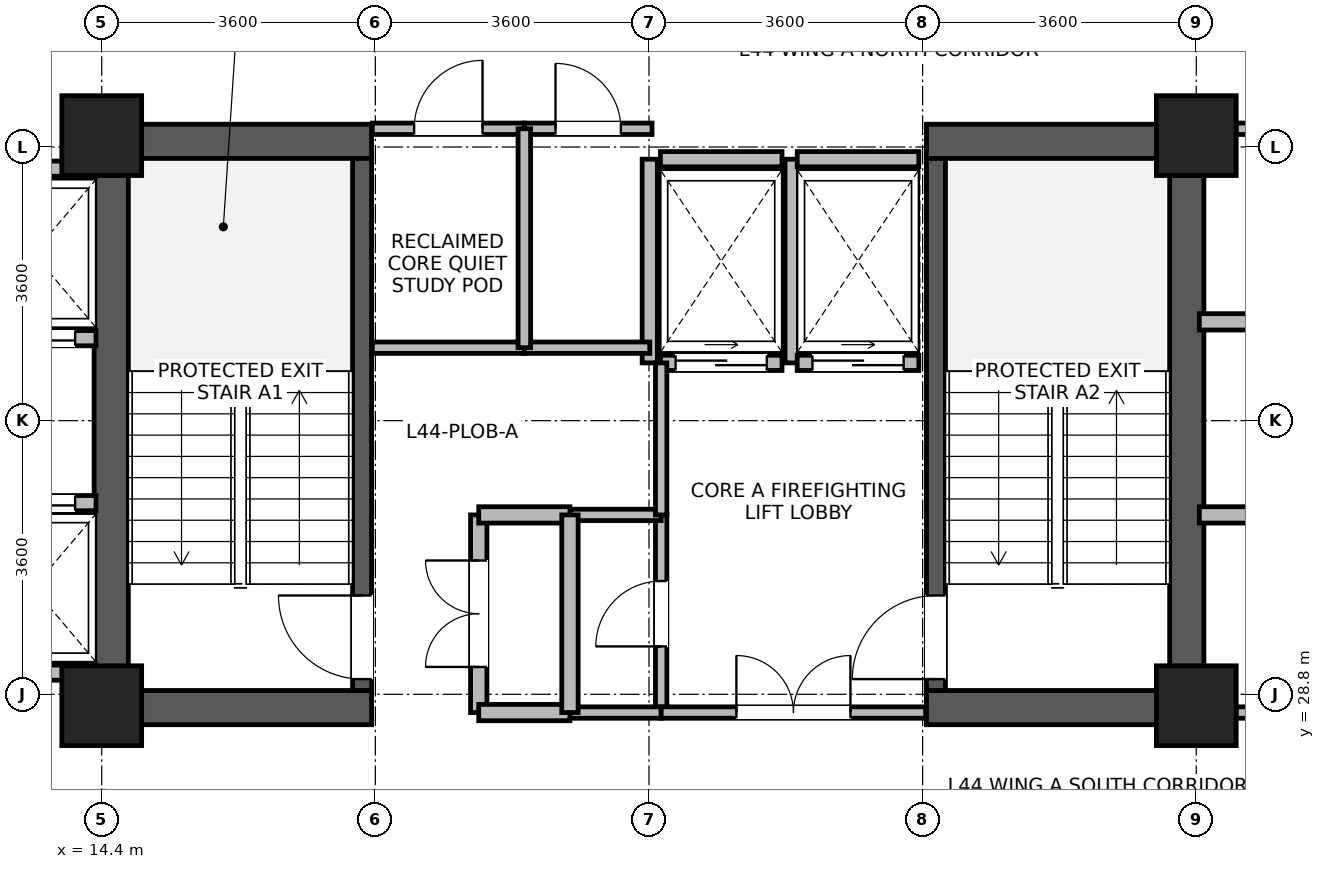
"""IFC4 building model, lengths in metres.
Left out: names, types, materials, properties, quantities, classifications, styles, units other than length and angle.
Written with IfcOpenShell. Run it as: python <this file> out.ifc"""

import sys

from ifc_helpers import new_model, si_unit, direction, frame, frame_2d, origin, origin_2d, place, context, subcontext, project, spatial, rectangle, extrude, source, transform, mapped, element, fill, save


model = new_model("IFC4")
c1 = context("Model", 3, precision=1e-05, world=origin(), true_north=direction((0.0, 1.0)))
c2 = subcontext(c1, "Body", "Model", "MODEL_VIEW")
j1 = project(units=[si_unit("LENGTHUNIT", "METRE"), si_unit("PLANEANGLEUNIT", "RADIAN")], contexts=[c1])
p1 = place(None, origin())
s1 = spatial("IfcSite", under=j1, at=p1, CompositionType="ELEMENT")
p2 = place(p1, origin())
s2 = spatial("IfcBuilding", under=s1, at=p2, CompositionType="ELEMENT")
p3 = place(p2, frame((0.0, 0.0, 173.5)))
s3 = spatial("IfcBuildingStorey", under=s2, at=p3, CompositionType="ELEMENT", Elevation=173.5)
for number, where, z_axis, x_axis in (
    (1, (14.525, 28.4, 0.0), (0.0, 0.0, 1.0), (0.0, 1.0, 0.0)),
    (2, (28.675, 28.4, 0.0), (0.0, 0.0, 1.0), (0.0, 1.0, 0.0)),
):
    element("IfcWall", number, at=place(p3, frame(where, z_axis=z_axis, x_axis=x_axis)), inside=s3, PredefinedType="SHEAR", context=c2, shape_type="SweptSolid", body=[
        extrude(rectangle(XDim=7.9, YDim=0.45, at=frame_2d((3.95, 0.0))), origin(), (0.0, 0.0, 1.0), 3.46),
    ])
for number, where, z_axis, x_axis in (
    (3, (14.75, 28.625, 0.0), (0.0, 0.0, 1.0), (1.0, 0.0, 0.0)),
    (4, (25.25, 28.625, 0.0), (0.0, 0.0, 1.0), (1.0, 0.0, 0.0)),
    (5, (14.75, 36.075, 0.0), (0.0, 0.0, 1.0), (1.0, 0.0, 0.0)),
    (6, (25.25, 36.075, 0.0), (0.0, 0.0, 1.0), (1.0, 0.0, 0.0)),
):
    element("IfcWall", number, at=place(p3, frame(where, z_axis=z_axis, x_axis=x_axis)), inside=s3, PredefinedType="SHEAR", context=c2, shape_type="SweptSolid", body=[
        extrude(rectangle(XDim=3.2, YDim=0.45, at=frame_2d((1.6, 0.0))), origin(), (0.0, 0.0, 1.0), 3.46),
    ])
p4 = place(p3, frame((17.825, 28.85, 0.0), z_axis=(0.0, 0.0, 1.0), x_axis=(0.0, 1.0, 0.0)))
e7 = element("IfcWall", 7, at=p4, inside=s3, PredefinedType="SHEAR", context=c2, shape_type="SweptSolid", body=[
    extrude(rectangle(XDim=7.0, YDim=0.25, at=frame_2d((3.5, 0.0))), origin(), (0.0, 0.0, 1.0), 3.46),
])
p5 = place(p4, frame((0.15, 0.0, 0.0)))
e8 = element("IfcOpeningElement", 8, at=p5, cuts=e7, PredefinedType="OPENING", context=c2, shape_type="SweptSolid", body=[
    extrude(rectangle(XDim=1.1, YDim=2.08, at=frame_2d((0.55, 1.04))), frame((0.0, 0.135, 0.0), z_axis=(0.0, -1.0, 0.0), x_axis=(1.0, 0.0, 0.0)), (0.0, 0.0, 1.0), 0.27),
])
p6 = place(p3, frame((25.375, 28.85, 0.0), z_axis=(0.0, 0.0, 1.0), x_axis=(0.0, 1.0, 0.0)))
e9 = element("IfcWall", 9, at=p6, inside=s3, PredefinedType="SHEAR", context=c2, shape_type="SweptSolid", body=[
    extrude(rectangle(XDim=7.0, YDim=0.25, at=frame_2d((3.5, 0.0))), origin(), (0.0, 0.0, 1.0), 3.46),
])
p7 = place(p6, frame((0.15, 0.0, 0.0)))
e10 = element("IfcOpeningElement", 10, at=p7, cuts=e9, PredefinedType="OPENING", context=c2, shape_type="SweptSolid", body=[
    extrude(rectangle(XDim=1.1, YDim=2.08, at=frame_2d((0.55, 1.04))), frame((0.0, 0.135, 0.0), z_axis=(0.0, -1.0, 0.0), x_axis=(1.0, 0.0, 0.0)), (0.0, 0.0, 1.0), 0.27),
])
m1 = source(origin(), c2, "Body", "SweptSolid", [
    extrude(rectangle(XDim=1.05, YDim=1.05, at=origin_2d()), origin(), (0.0, 0.0, 1.0), 3.7),
])
for number, where, z_axis, x_axis in (
    (11, (14.4, 28.65, 0.0), (0.0, 0.0, 1.0), (1.0, 0.0, 0.0)),
    (12, (14.4, 36.15, 0.0), (0.0, 0.0, 1.0), (1.0, 0.0, 0.0)),
    (13, (28.8, 28.65, 0.0), (0.0, 0.0, 1.0), (1.0, 0.0, 0.0)),
    (14, (28.8, 36.15, 0.0), (0.0, 0.0, 1.0), (1.0, 0.0, 0.0)),
):
    element("IfcColumn", number, at=place(p3, frame(where, z_axis=z_axis, x_axis=x_axis)), inside=s3, PredefinedType="COLUMN", context=c2, shape_type="MappedRepresentation", body=[
        mapped(m1, transform((0.0, 0.0, 0.0), x_axis=(1.0, 0.0, 0.0), y_axis=(0.0, 1.0, 0.0), z_axis=(0.0, 0.0, 1.0), scale=1.0)),
    ])
p8 = place(p3, frame((12.675, 33.485, 0.0), z_axis=(0.0, 0.0, 1.0), x_axis=(1.0, 0.0, 0.0)))
e15 = element("IfcWall", 15, at=p8, inside=s3, PredefinedType="PARTITIONING", context=c2, shape_type="SweptSolid", body=[
    extrude(rectangle(XDim=1.65, YDim=0.2, at=frame_2d((0.825, 0.0))), origin(), (0.0, 0.0, 1.0), 3.44),
])
p9 = place(p8, frame((0.275, 0.0, 0.0)))
e16 = element("IfcOpeningElement", 16, at=p9, cuts=e15, PredefinedType="OPENING", context=c2, shape_type="SweptSolid", body=[
    extrude(rectangle(XDim=1.1, YDim=2.12, at=frame_2d((0.55, 1.06))), frame((0.0, 0.11, 0.0), z_axis=(0.0, -1.0, 0.0), x_axis=(1.0, 0.0, 0.0)), (0.0, 0.0, 1.0), 0.22),
])
for number, where, z_axis, x_axis in (
    (17, (12.675, 35.715, 0.0), (0.0, 0.0, 1.0), (1.0, 0.0, 0.0)),
    (18, (12.675, 29.085, 0.0), (0.0, 0.0, 1.0), (1.0, 0.0, 0.0)),
):
    element("IfcWall", number, at=place(p3, frame(where, z_axis=z_axis, x_axis=x_axis)), inside=s3, PredefinedType="PARTITIONING", context=c2, shape_type="SweptSolid", body=[
        extrude(rectangle(XDim=1.65, YDim=0.2, at=frame_2d((0.825, 0.0))), origin(), (0.0, 0.0, 1.0), 3.44),
    ])
p10 = place(p3, frame((12.675, 31.315, 0.0), z_axis=(0.0, 0.0, 1.0), x_axis=(1.0, 0.0, 0.0)))
e19 = element("IfcWall", 19, at=p10, inside=s3, PredefinedType="PARTITIONING", context=c2, shape_type="SweptSolid", body=[
    extrude(rectangle(XDim=1.65, YDim=0.2, at=frame_2d((0.825, 0.0))), origin(), (0.0, 0.0, 1.0), 3.44),
])
p11 = place(p10, frame((0.275, 0.0, 0.0)))
e20 = element("IfcOpeningElement", 20, at=p11, cuts=e19, PredefinedType="OPENING", context=c2, shape_type="SweptSolid", body=[
    extrude(rectangle(XDim=1.1, YDim=2.12, at=frame_2d((0.55, 1.06))), frame((0.0, 0.11, 0.0), z_axis=(0.0, -1.0, 0.0), x_axis=(1.0, 0.0, 0.0)), (0.0, 0.0, 1.0), 0.22),
])
p12 = place(p3, frame((21.75, 33.16, 0.0), z_axis=(0.0, 0.0, 1.0), x_axis=(1.0, 0.0, 0.0)))
e21 = element("IfcWall", 21, at=p12, inside=s3, PredefinedType="PARTITIONING", context=c2, shape_type="SweptSolid", body=[
    extrude(rectangle(XDim=1.6, YDim=0.2, at=frame_2d((0.8, 0.0))), origin(), (0.0, 0.0, 1.0), 3.44),
])
p13 = place(p12, frame((0.2, 0.0, 0.0)))
e22 = element("IfcOpeningElement", 22, at=p13, cuts=e21, PredefinedType="OPENING", context=c2, shape_type="SweptSolid", body=[
    extrude(rectangle(XDim=1.2, YDim=2.12, at=frame_2d((0.6, 1.06))), frame((0.0, 0.11, 0.0), z_axis=(0.0, -1.0, 0.0), x_axis=(1.0, 0.0, 0.0)), (0.0, 0.0, 1.0), 0.22),
])
p14 = place(p3, frame((21.75, 35.84, 0.0), z_axis=(0.0, 0.0, 1.0), x_axis=(1.0, 0.0, 0.0)))
e23 = element("IfcWall", 23, at=p14, inside=s3, PredefinedType="PARTITIONING", context=c2, shape_type="SweptSolid", body=[
    extrude(rectangle(XDim=1.6, YDim=0.2, at=frame_2d((0.8, 0.0))), origin(), (0.0, 0.0, 1.0), 2.44),
])
for number, where, z_axis, x_axis in (
    (24, (21.61, 33.16, 0.0), (0.0, 0.0, 1.0), (0.0, 1.0, 0.0)),
    (25, (23.49, 33.16, 0.0), (0.0, 0.0, 1.0), (0.0, 1.0, 0.0)),
):
    element("IfcWall", number, at=place(p3, frame(where, z_axis=z_axis, x_axis=x_axis)), inside=s3, PredefinedType="PARTITIONING", context=c2, shape_type="SweptSolid", body=[
        extrude(rectangle(XDim=2.68, YDim=0.2, at=frame_2d((1.34, 0.0))), origin(), (0.0, 0.0, 1.0), 3.44),
    ])
p15 = place(p3, frame((23.55, 33.16, 0.0), z_axis=(0.0, 0.0, 1.0), x_axis=(1.0, 0.0, 0.0)))
e26 = element("IfcWall", 26, at=p15, inside=s3, PredefinedType="PARTITIONING", context=c2, shape_type="SweptSolid", body=[
    extrude(rectangle(XDim=1.6, YDim=0.2, at=frame_2d((0.8, 0.0))), origin(), (0.0, 0.0, 1.0), 3.44),
])
p16 = place(p15, frame((0.2, 0.0, 0.0)))
e27 = element("IfcOpeningElement", 27, at=p16, cuts=e26, PredefinedType="OPENING", context=c2, shape_type="SweptSolid", body=[
    extrude(rectangle(XDim=1.2, YDim=2.12, at=frame_2d((0.6, 1.06))), frame((0.0, 0.11, 0.0), z_axis=(0.0, -1.0, 0.0), x_axis=(1.0, 0.0, 0.0)), (0.0, 0.0, 1.0), 0.22),
])
p17 = place(p3, frame((23.55, 35.84, 0.0), z_axis=(0.0, 0.0, 1.0), x_axis=(1.0, 0.0, 0.0)))
e28 = element("IfcWall", 28, at=p17, inside=s3, PredefinedType="PARTITIONING", context=c2, shape_type="SweptSolid", body=[
    extrude(rectangle(XDim=1.6, YDim=0.2, at=frame_2d((0.8, 0.0))), origin(), (0.0, 0.0, 1.0), 2.44),
])
p18 = place(p3, frame((19.36, 28.56, 0.0), z_axis=(0.0, 0.0, 1.0), x_axis=(0.0, 1.0, 0.0)))
e29 = element("IfcWall", 29, at=p18, inside=s3, PredefinedType="PARTITIONING", context=c2, shape_type="SweptSolid", body=[
    extrude(rectangle(XDim=2.6, YDim=0.215, at=frame_2d((1.3, 0.0))), origin(), (0.0, 0.0, 1.0), 3.44),
])
p19 = place(p18, frame((0.6, 0.0, 0.0)))
e30 = element("IfcOpeningElement", 30, at=p19, cuts=e29, PredefinedType="OPENING", context=c2, shape_type="SweptSolid", body=[
    extrude(rectangle(XDim=1.4, YDim=2.15, at=frame_2d((0.7, 1.075))), frame((0.0, 0.118, 0.0), z_axis=(0.0, -1.0, 0.0), x_axis=(1.0, 0.0, 0.0)), (0.0, 0.0, 1.0), 0.235),
])
p20 = place(p3, frame((21.76, 28.56, 0.0), z_axis=(0.0, 0.0, 1.0), x_axis=(0.0, 1.0, 0.0)))
e31 = element("IfcWall", 31, at=p20, inside=s3, PredefinedType="PARTITIONING", context=c2, shape_type="SweptSolid", body=[
    extrude(rectangle(XDim=2.6, YDim=0.15, at=frame_2d((1.3, 0.0))), origin(), (0.0, 0.0, 1.0), 3.44),
])
p21 = place(p20, frame((0.87, 0.0, 0.0)))
e32 = element("IfcOpeningElement", 32, at=p21, cuts=e31, PredefinedType="OPENING", context=c2, shape_type="SweptSolid", body=[
    extrude(rectangle(XDim=0.86, YDim=2.02, at=frame_2d((0.43, 1.01))), frame((0.0, 0.085, 0.0), z_axis=(0.0, -1.0, 0.0), x_axis=(1.0, 0.0, 0.0)), (0.0, 0.0, 1.0), 0.17),
])
p22 = place(p3, frame((17.96, 33.36, 0.0), z_axis=(0.0, 0.0, 1.0), x_axis=(1.0, 0.0, 0.0)))
e33 = element("IfcWall", 33, at=p22, inside=s3, PredefinedType="PARTITIONING", context=c2, shape_type="SweptSolid", body=[
    extrude(rectangle(XDim=2.0, YDim=0.15, at=frame_2d((1.0, 0.0))), origin(), (0.0, 0.0, 1.0), 3.44),
])
p23 = place(p3, frame((17.96, 36.24, 0.0), z_axis=(0.0, 0.0, 1.0), x_axis=(1.0, 0.0, 0.0)))
e34 = element("IfcWall", 34, at=p23, inside=s3, PredefinedType="PARTITIONING", context=c2, shape_type="SweptSolid", body=[
    extrude(rectangle(XDim=2.0, YDim=0.15, at=frame_2d((1.0, 0.0))), origin(), (0.0, 0.0, 1.0), 2.44),
])
p24 = place(p23, frame((0.55, 0.0, 0.0)))
e35 = element("IfcOpeningElement", 35, at=p24, cuts=e34, PredefinedType="OPENING", context=c2, shape_type="SweptSolid", body=[
    extrude(rectangle(XDim=0.9, YDim=2.08, at=frame_2d((0.45, 1.04))), frame((0.0, 0.085, 0.0), z_axis=(0.0, -1.0, 0.0), x_axis=(1.0, 0.0, 0.0)), (0.0, 0.0, 1.0), 0.17),
])
for number, where, z_axis, x_axis in (
    (36, (29.325, 28.56, 0.0), (0.0, 0.0, 1.0), (1.0, 0.0, 0.0)),
    (37, (29.325, 36.24, 0.0), (0.0, 0.0, 1.0), (1.0, 0.0, 0.0)),
):
    element("IfcWall", number, at=place(p3, frame(where, z_axis=z_axis, x_axis=x_axis)), inside=s3, PredefinedType="PARTITIONING", context=c2, shape_type="SweptSolid", body=[
        extrude(rectangle(XDim=1.235, YDim=0.15, at=frame_2d((0.618, 0.0))), origin(), (0.0, 0.0, 1.0), 2.84),
    ])
p25 = place(p3, frame((19.96, 33.36, 0.0), z_axis=(0.0, 0.0, 1.0), x_axis=(1.0, 0.0, 0.0)))
e38 = element("IfcWall", 38, at=p25, inside=s3, PredefinedType="PARTITIONING", context=c2, shape_type="SweptSolid", body=[
    extrude(rectangle(XDim=1.65, YDim=0.15, at=frame_2d((0.825, 0.0))), origin(), (0.0, 0.0, 1.0), 3.44),
])
p26 = place(p3, frame((19.96, 36.24, 0.0), z_axis=(0.0, 0.0, 1.0), x_axis=(1.0, 0.0, 0.0)))
e39 = element("IfcWall", 39, at=p26, inside=s3, PredefinedType="PARTITIONING", context=c2, shape_type="SweptSolid", body=[
    extrude(rectangle(XDim=1.68, YDim=0.15, at=frame_2d((0.84, 0.0))), origin(), (0.0, 0.0, 1.0), 2.44),
])
p27 = place(p26, frame((0.41, 0.0, 0.0)))
e40 = element("IfcOpeningElement", 40, at=p27, cuts=e39, PredefinedType="OPENING", context=c2, shape_type="SweptSolid", body=[
    extrude(rectangle(XDim=0.86, YDim=2.02, at=frame_2d((0.43, 1.01))), frame((0.0, 0.085, 0.0), z_axis=(0.0, -1.0, 0.0), x_axis=(1.0, 0.0, 0.0)), (0.0, 0.0, 1.0), 0.17),
])
p28 = place(p3, frame((20.56, 28.56, 0.0), z_axis=(0.0, 0.0, 1.0), x_axis=(1.0, 0.0, 0.0)))
e41 = element("IfcWall", 41, at=p28, inside=s3, PredefinedType="PARTITIONING", context=c2, shape_type="SweptSolid", body=[
    extrude(rectangle(XDim=1.2, YDim=0.15, at=frame_2d((0.6, 0.0))), origin(), (0.0, 0.0, 1.0), 2.44),
])
p29 = place(p3, frame((20.56, 31.16, 0.0), z_axis=(0.0, 0.0, 1.0), x_axis=(1.0, 0.0, 0.0)))
e42 = element("IfcWall", 42, at=p29, inside=s3, PredefinedType="PARTITIONING", context=c2, shape_type="SweptSolid", body=[
    extrude(rectangle(XDim=1.2, YDim=0.15, at=frame_2d((0.6, 0.0))), origin(), (0.0, 0.0, 1.0), 3.44),
])
p30 = place(p3, frame((19.36, 28.56, 0.0), z_axis=(0.0, 0.0, 1.0), x_axis=(1.0, 0.0, 0.0)))
e43 = element("IfcWall", 43, at=p30, inside=s3, PredefinedType="PARTITIONING", context=c2, shape_type="SweptSolid", body=[
    extrude(rectangle(XDim=1.2, YDim=0.215, at=frame_2d((0.6, 0.0))), origin(), (0.0, 0.0, 1.0), 2.44),
])
p31 = place(p3, frame((19.36, 31.16, 0.0), z_axis=(0.0, 0.0, 1.0), x_axis=(1.0, 0.0, 0.0)))
e44 = element("IfcWall", 44, at=p31, inside=s3, PredefinedType="PARTITIONING", context=c2, shape_type="SweptSolid", body=[
    extrude(rectangle(XDim=1.2, YDim=0.215, at=frame_2d((0.6, 0.0))), origin(), (0.0, 0.0, 1.0), 3.44),
])
p32 = place(p3, frame((21.76, 28.56, 0.0), z_axis=(0.0, 0.0, 1.0), x_axis=(1.0, 0.0, 0.0)))
e45 = element("IfcWall", 45, at=p32, inside=s3, PredefinedType="PARTITIONING", context=c2, shape_type="SweptSolid", body=[
    extrude(rectangle(XDim=3.48, YDim=0.15, at=frame_2d((1.74, 0.0))), origin(), (0.0, 0.0, 1.0), 2.44),
])
p33 = place(p32, frame((0.99, 0.0, 0.0)))
e46 = element("IfcOpeningElement", 46, at=p33, cuts=e45, PredefinedType="OPENING", context=c2, shape_type="SweptSolid", body=[
    extrude(rectangle(XDim=1.5, YDim=2.1, at=frame_2d((0.75, 1.05))), frame((0.0, 0.085, 0.0), z_axis=(0.0, -1.0, 0.0), x_axis=(1.0, 0.0, 0.0)), (0.0, 0.0, 1.0), 0.17),
])
p34 = place(p3, frame((19.96, 33.36, 0.0), z_axis=(0.0, 0.0, 1.0), x_axis=(0.0, 1.0, 0.0)))
e47 = element("IfcWall", 47, at=p34, inside=s3, PredefinedType="PARTITIONING", context=c2, shape_type="SweptSolid", body=[
    extrude(rectangle(XDim=2.88, YDim=0.165, at=frame_2d((1.44, 0.0))), origin(), (0.0, 0.0, 1.0), 3.44),
])
p35 = place(p3, frame((20.56, 28.56, 0.0), z_axis=(0.0, 0.0, 1.0), x_axis=(0.0, 1.0, 0.0)))
e48 = element("IfcWall", 48, at=p35, inside=s3, PredefinedType="PARTITIONING", context=c2, shape_type="SweptSolid", body=[
    extrude(rectangle(XDim=2.6, YDim=0.215, at=frame_2d((1.3, 0.0))), origin(), (0.0, 0.0, 1.0), 3.44),
])
p36 = place(p3, frame((21.76, 31.16, 0.0), z_axis=(0.0, 0.0, 1.0), x_axis=(0.0, 1.0, 0.0)))
e49 = element("IfcWall", 49, at=p36, inside=s3, PredefinedType="PARTITIONING", context=c2, shape_type="SweptSolid", body=[
    extrude(rectangle(XDim=2.0, YDim=0.15, at=frame_2d((1.0, 0.0))), origin(), (0.0, 0.0, 1.0), 3.44),
])
for number, where, z_axis, x_axis in (
    (50, (28.84, 31.16, 0.0), (0.0, 0.0, 1.0), (1.0, 0.0, 0.0)),
    (51, (28.84, 33.7, 0.0), (0.0, 0.0, 1.0), (1.0, 0.0, 0.0)),
):
    element("IfcWall", number, at=place(p3, frame(where, z_axis=z_axis, x_axis=x_axis)), inside=s3, PredefinedType="PARTITIONING", context=c2, shape_type="SweptSolid", body=[
        extrude(rectangle(XDim=1.72, YDim=0.215, at=frame_2d((0.86, 0.0))), origin(), (0.0, 0.0, 1.0), 3.44),
    ])
p37 = place(p5, origin())
e52 = element("IfcDoor", 52, at=p37, inside=s3, OperationType="SINGLE_SWING_RIGHT", PredefinedType="DOOR", context=c2, shape_type="SweptSolid", body=[
    extrude(rectangle(XDim=1.1, YDim=2.08, at=frame_2d((0.55, 1.04))), frame((0.0, 0.025, 0.0), z_axis=(0.0, -1.0, 0.0), x_axis=(1.0, 0.0, 0.0)), (0.0, 0.0, 1.0), 0.05),
])
fill(e8, e52)
p38 = place(p7, origin())
e53 = element("IfcDoor", 53, at=p38, inside=s3, OperationType="SINGLE_SWING_LEFT", PredefinedType="DOOR", context=c2, shape_type="SweptSolid", body=[
    extrude(rectangle(XDim=1.1, YDim=2.08, at=frame_2d((0.55, 1.04))), frame((0.0, 0.025, 0.0), z_axis=(0.0, -1.0, 0.0), x_axis=(1.0, 0.0, 0.0)), (0.0, 0.0, 1.0), 0.05),
])
fill(e10, e53)
p39 = place(p9, origin())
e54 = element("IfcDoor", 54, at=p39, inside=s3, OperationType="SLIDING_TO_LEFT", PredefinedType="DOOR", context=c2, shape_type="SweptSolid", body=[
    extrude(rectangle(XDim=1.1, YDim=2.12, at=frame_2d((0.55, 1.06))), frame((0.0, 0.025, 0.0), z_axis=(0.0, -1.0, 0.0), x_axis=(1.0, 0.0, 0.0)), (0.0, 0.0, 1.0), 0.05),
])
fill(e16, e54)
p40 = place(p11, origin())
e55 = element("IfcDoor", 55, at=p40, inside=s3, OperationType="SLIDING_TO_LEFT", PredefinedType="DOOR", context=c2, shape_type="SweptSolid", body=[
    extrude(rectangle(XDim=1.1, YDim=2.12, at=frame_2d((0.55, 1.06))), frame((0.0, 0.025, 0.0), z_axis=(0.0, -1.0, 0.0), x_axis=(1.0, 0.0, 0.0)), (0.0, 0.0, 1.0), 0.05),
])
fill(e20, e55)
p41 = place(p13, origin())
e56 = element("IfcDoor", 56, at=p41, inside=s3, OperationType="SLIDING_TO_RIGHT", PredefinedType="DOOR", context=c2, shape_type="SweptSolid", body=[
    extrude(rectangle(XDim=1.2, YDim=2.12, at=frame_2d((0.6, 1.06))), frame((0.0, 0.025, 0.0), z_axis=(0.0, -1.0, 0.0), x_axis=(1.0, 0.0, 0.0)), (0.0, 0.0, 1.0), 0.05),
])
fill(e22, e56)
p42 = place(p16, origin())
e57 = element("IfcDoor", 57, at=p42, inside=s3, OperationType="SLIDING_TO_RIGHT", PredefinedType="DOOR", context=c2, shape_type="SweptSolid", body=[
    extrude(rectangle(XDim=1.2, YDim=2.12, at=frame_2d((0.6, 1.06))), frame((0.0, 0.025, 0.0), z_axis=(0.0, -1.0, 0.0), x_axis=(1.0, 0.0, 0.0)), (0.0, 0.0, 1.0), 0.05),
])
fill(e27, e57)
p43 = place(p19, origin())
e58 = element("IfcDoor", 58, at=p43, inside=s3, OperationType="DOUBLE_DOOR_SINGLE_SWING", PredefinedType="DOOR", context=c2, shape_type="SweptSolid", body=[
    extrude(rectangle(XDim=1.4, YDim=2.15, at=frame_2d((0.7, 1.075))), frame((0.0, 0.025, 0.0), z_axis=(0.0, -1.0, 0.0), x_axis=(1.0, 0.0, 0.0)), (0.0, 0.0, 1.0), 0.05),
])
fill(e30, e58)
p44 = place(p21, origin())
e59 = element("IfcDoor", 59, at=p44, inside=s3, OperationType="SINGLE_SWING_LEFT", PredefinedType="DOOR", context=c2, shape_type="SweptSolid", body=[
    extrude(rectangle(XDim=0.86, YDim=2.02, at=frame_2d((0.43, 1.01))), frame((0.0, 0.025, 0.0), z_axis=(0.0, -1.0, 0.0), x_axis=(1.0, 0.0, 0.0)), (0.0, 0.0, 1.0), 0.05),
])
fill(e32, e59)
p45 = place(p24, origin())
e60 = element("IfcDoor", 60, at=p45, inside=s3, OperationType="SINGLE_SWING_RIGHT", PredefinedType="DOOR", context=c2, shape_type="SweptSolid", body=[
    extrude(rectangle(XDim=0.9, YDim=2.08, at=frame_2d((0.45, 1.04))), frame((0.0, 0.025, 0.0), z_axis=(0.0, -1.0, 0.0), x_axis=(1.0, 0.0, 0.0)), (0.0, 0.0, 1.0), 0.05),
])
fill(e35, e60)
p46 = place(p27, origin())
e61 = element("IfcDoor", 61, at=p46, inside=s3, OperationType="SINGLE_SWING_LEFT", PredefinedType="DOOR", context=c2, shape_type="SweptSolid", body=[
    extrude(rectangle(XDim=0.86, YDim=2.02, at=frame_2d((0.43, 1.01))), frame((0.0, 0.025, 0.0), z_axis=(0.0, -1.0, 0.0), x_axis=(1.0, 0.0, 0.0)), (0.0, 0.0, 1.0), 0.05),
])
fill(e40, e61)
p47 = place(p33, origin())
e62 = element("IfcDoor", 62, at=p47, inside=s3, OperationType="DOUBLE_DOOR_SINGLE_SWING", PredefinedType="DOOR", context=c2, shape_type="SweptSolid", body=[
    extrude(rectangle(XDim=1.5, YDim=2.1, at=frame_2d((0.75, 1.05))), frame((0.0, 0.025, 0.0), z_axis=(0.0, -1.0, 0.0), x_axis=(1.0, 0.0, 0.0)), (0.0, 0.0, 1.0), 0.05),
])
fill(e46, e62)
save(model, sys.argv[1])
